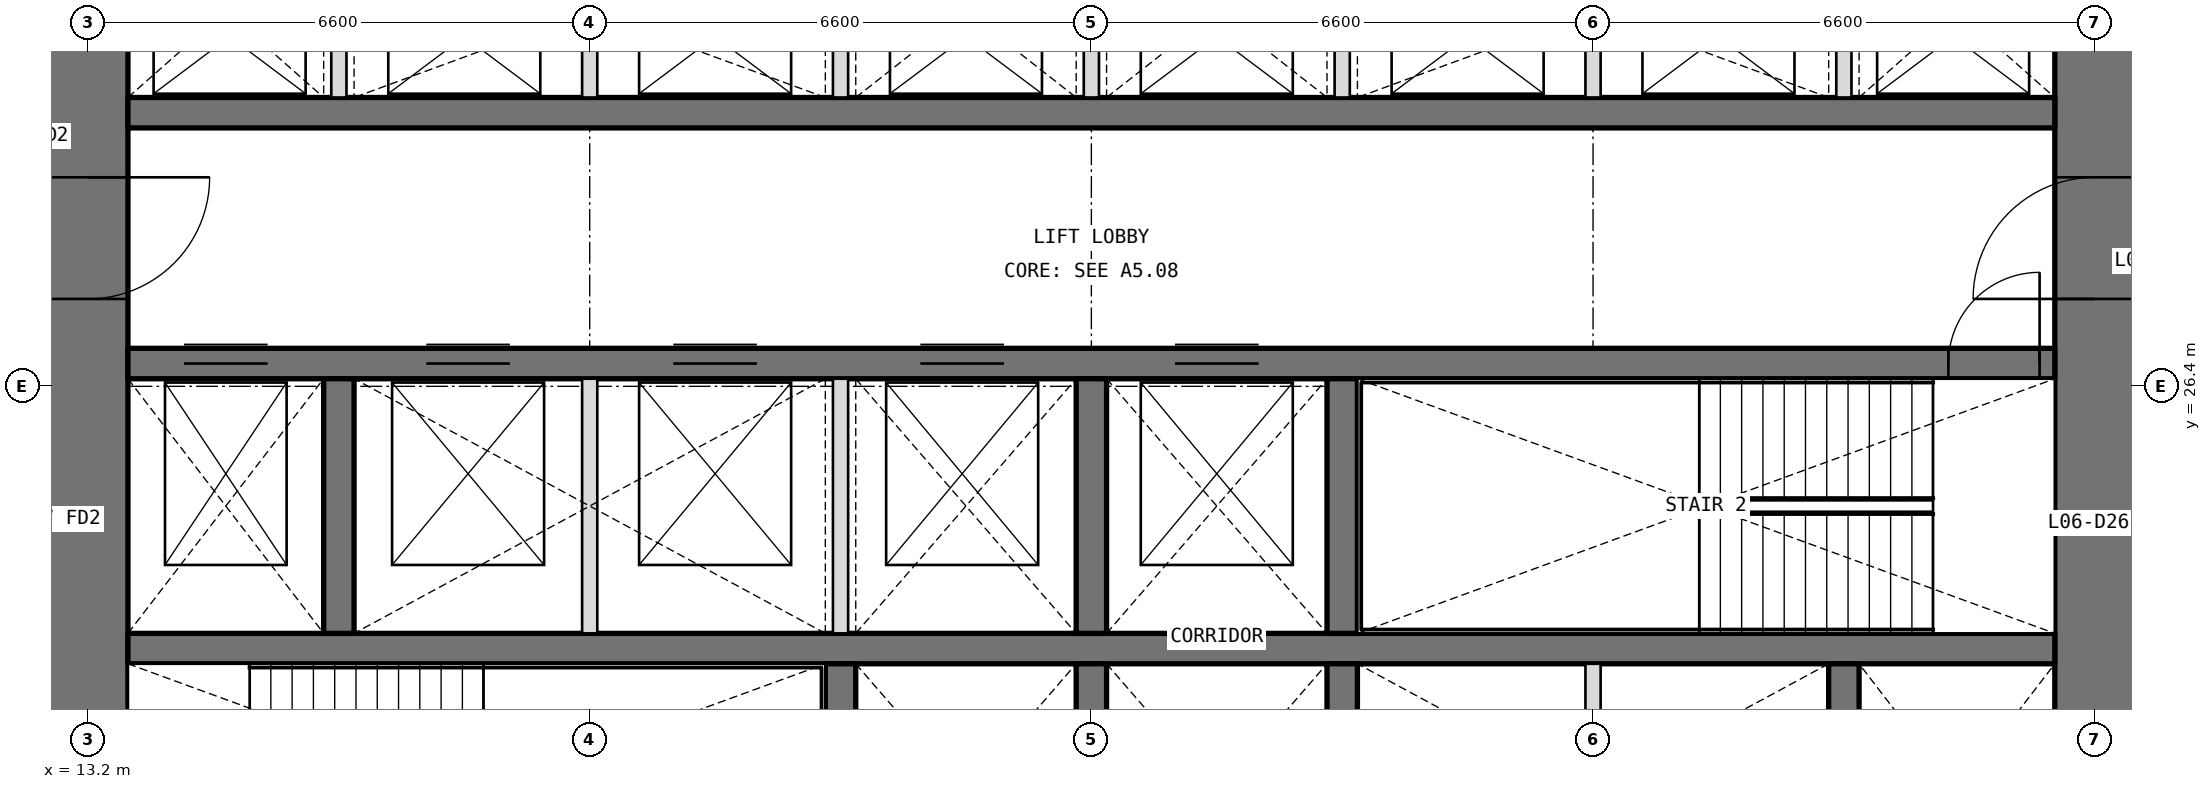
"""IFC4 building model, lengths in metres.
Left out: names, types, materials, properties, quantities, classifications, styles, units other than length and angle.
Written with IfcOpenShell. Run it as: python <this file> out.ifc"""

import sys

from ifc_helpers import new_model, si_unit, direction, frame, frame_2d, origin, place, context, subcontext, project, spatial, rectangle, extrude, element, fill, save


model = new_model("IFC4")
c1 = context("Model", 3, precision=1e-05, world=origin(), true_north=direction((0.0, 1.0)))
c2 = subcontext(c1, "Body", "Model", "MODEL_VIEW")
j1 = project(units=[si_unit("LENGTHUNIT", "METRE"), si_unit("PLANEANGLEUNIT", "RADIAN")], contexts=[c1])
p1 = place(None, origin())
s1 = spatial("IfcSite", under=j1, at=p1, CompositionType="ELEMENT")
p2 = place(p1, origin())
s2 = spatial("IfcBuilding", under=s1, at=p2, CompositionType="ELEMENT")
p3 = place(p2, frame((0.0, 0.0, 29.7)))
s3 = spatial("IfcBuildingStorey", under=s2, at=p3, CompositionType="ELEMENT", Elevation=29.7)
p4 = place(p3, frame((39.6, 13.725, 0.0), z_axis=(0.0, 0.0, 1.0), x_axis=(0.0, 1.0, 0.0)))
e1 = element("IfcWall", 1, at=p4, inside=s3, PredefinedType="SHEAR", context=c2, shape_type="SweptSolid", body=[
    extrude(rectangle(XDim=18.75, YDim=1.05, at=frame_2d((9.375, 0.0))), origin(), (0.0, 0.0, 1.0), 4.2),
])
p5 = place(p4, frame((3.025, 0.0, 0.0)))
e2 = element("IfcOpeningElement", 2, at=p5, cuts=e1, PredefinedType="OPENING", context=c2, shape_type="SweptSolid", body=[
    extrude(rectangle(XDim=1.6, YDim=2.1, at=frame_2d((0.8, 1.05))), frame((0.0, 0.535, 0.0), z_axis=(0.0, -1.0, 0.0), x_axis=(1.0, 0.0, 0.0)), (0.0, 0.0, 1.0), 1.07),
])
p6 = place(p4, frame((13.825, 0.0, 0.0)))
e3 = element("IfcOpeningElement", 3, at=p6, cuts=e1, PredefinedType="OPENING", context=c2, shape_type="SweptSolid", body=[
    extrude(rectangle(XDim=1.6, YDim=2.1, at=frame_2d((0.8, 1.05))), frame((0.0, 0.535, 0.0), z_axis=(0.0, -1.0, 0.0), x_axis=(1.0, 0.0, 0.0)), (0.0, 0.0, 1.0), 1.07),
])
p7 = place(p3, frame((13.2, 32.475, 0.0), z_axis=(0.0, 0.0, 1.0), x_axis=(0.0, -1.0, 0.0)))
e4 = element("IfcWall", 4, at=p7, inside=s3, PredefinedType="SHEAR", context=c2, shape_type="SweptSolid", body=[
    extrude(rectangle(XDim=18.75, YDim=1.05, at=frame_2d((9.375, 0.0))), origin(), (0.0, 0.0, 1.0), 4.2),
])
p8 = place(p7, frame((14.125, 0.0, 0.0)))
e5 = element("IfcOpeningElement", 5, at=p8, cuts=e4, PredefinedType="OPENING", context=c2, shape_type="SweptSolid", body=[
    extrude(rectangle(XDim=1.6, YDim=2.1, at=frame_2d((0.8, 1.05))), frame((0.0, 0.535, 0.0), z_axis=(0.0, -1.0, 0.0), x_axis=(1.0, 0.0, 0.0)), (0.0, 0.0, 1.0), 1.07),
])
p9 = place(p7, frame((3.325, 0.0, 0.0)))
e6 = element("IfcOpeningElement", 6, at=p9, cuts=e4, PredefinedType="OPENING", context=c2, shape_type="SweptSolid", body=[
    extrude(rectangle(XDim=1.6, YDim=2.1, at=frame_2d((0.8, 1.05))), frame((0.0, 0.535, 0.0), z_axis=(0.0, -1.0, 0.0), x_axis=(1.0, 0.0, 0.0)), (0.0, 0.0, 1.0), 1.07),
])
p10 = place(p3, frame((13.725, 22.95, 0.0), z_axis=(0.0, 0.0, 1.0), x_axis=(1.0, 0.0, 0.0)))
e7 = element("IfcWall", 7, at=p10, inside=s3, PredefinedType="SHEAR", context=c2, shape_type="SweptSolid", body=[
    extrude(rectangle(XDim=25.35, YDim=0.4, at=frame_2d((12.675, 0.0))), origin(), (0.0, 0.0, 1.0), 4.2),
])
p11 = place(p3, frame((13.725, 26.7, 0.0), z_axis=(0.0, 0.0, 1.0), x_axis=(1.0, 0.0, 0.0)))
e8 = element("IfcWall", 8, at=p11, inside=s3, PredefinedType="SHEAR", context=c2, shape_type="SweptSolid", body=[
    extrude(rectangle(XDim=25.35, YDim=0.4, at=frame_2d((12.675, 0.0))), origin(), (0.0, 0.0, 1.0), 4.2),
])
p12 = place(p11, frame((23.95, 0.0, 0.0)))
e9 = element("IfcOpeningElement", 9, at=p12, cuts=e8, PredefinedType="OPENING", context=c2, shape_type="SweptSolid", body=[
    extrude(rectangle(XDim=1.2, YDim=2.1, at=frame_2d((0.6, 1.05))), frame((0.0, 0.21, 0.0), z_axis=(0.0, -1.0, 0.0), x_axis=(1.0, 0.0, 0.0)), (0.0, 0.0, 1.0), 0.42),
])
p13 = place(p11, frame((0.738, 0.0, 0.0)))
e10 = element("IfcOpeningElement", 10, at=p13, cuts=e8, PredefinedType="OPENING", context=c2, shape_type="SweptSolid", body=[
    extrude(rectangle(XDim=1.1, YDim=2.1, at=frame_2d((0.55, 1.05))), frame((0.0, 0.21, 0.0), z_axis=(0.0, -1.0, 0.0), x_axis=(1.0, 0.0, 0.0)), (0.0, 0.0, 1.0), 0.42),
])
p14 = place(p11, frame((3.925, 0.0, 0.0)))
e11 = element("IfcOpeningElement", 11, at=p14, cuts=e8, PredefinedType="OPENING", context=c2, shape_type="SweptSolid", body=[
    extrude(rectangle(XDim=1.1, YDim=2.1, at=frame_2d((0.55, 1.05))), frame((0.0, 0.21, 0.0), z_axis=(0.0, -1.0, 0.0), x_axis=(1.0, 0.0, 0.0)), (0.0, 0.0, 1.0), 0.42),
])
p15 = place(p11, frame((7.175, 0.0, 0.0)))
e12 = element("IfcOpeningElement", 12, at=p15, cuts=e8, PredefinedType="OPENING", context=c2, shape_type="SweptSolid", body=[
    extrude(rectangle(XDim=1.1, YDim=2.1, at=frame_2d((0.55, 1.05))), frame((0.0, 0.21, 0.0), z_axis=(0.0, -1.0, 0.0), x_axis=(1.0, 0.0, 0.0)), (0.0, 0.0, 1.0), 0.42),
])
p16 = place(p11, frame((10.425, 0.0, 0.0)))
e13 = element("IfcOpeningElement", 13, at=p16, cuts=e8, PredefinedType="OPENING", context=c2, shape_type="SweptSolid", body=[
    extrude(rectangle(XDim=1.1, YDim=2.1, at=frame_2d((0.55, 1.05))), frame((0.0, 0.21, 0.0), z_axis=(0.0, -1.0, 0.0), x_axis=(1.0, 0.0, 0.0)), (0.0, 0.0, 1.0), 0.42),
])
p17 = place(p11, frame((13.775, 0.0, 0.0)))
e14 = element("IfcOpeningElement", 14, at=p17, cuts=e8, PredefinedType="OPENING", context=c2, shape_type="SweptSolid", body=[
    extrude(rectangle(XDim=1.1, YDim=2.1, at=frame_2d((0.55, 1.05))), frame((0.0, 0.21, 0.0), z_axis=(0.0, -1.0, 0.0), x_axis=(1.0, 0.0, 0.0)), (0.0, 0.0, 1.0), 0.42),
])
p18 = place(p3, frame((13.725, 30.0, 0.0), z_axis=(0.0, 0.0, 1.0), x_axis=(1.0, 0.0, 0.0)))
e15 = element("IfcWall", 15, at=p18, inside=s3, PredefinedType="SHEAR", context=c2, shape_type="SweptSolid", body=[
    extrude(rectangle(XDim=25.35, YDim=0.4, at=frame_2d((12.675, 0.0))), origin(), (0.0, 0.0, 1.0), 4.2),
])
for number, where, z_axis, x_axis in (
    (16, (23.1, 19.4, 0.0), (0.0, 0.0, 1.0), (0.0, 1.0, 0.0)),
    (17, (26.4, 19.4, 0.0), (0.0, 0.0, 1.0), (0.0, 1.0, 0.0)),
    (18, (29.7, 19.4, 0.0), (0.0, 0.0, 1.0), (0.0, 1.0, 0.0)),
    (19, (36.3, 19.4, 0.0), (0.0, 0.0, 1.0), (0.0, 1.0, 0.0)),
    (20, (16.5, 23.15, 0.0), (0.0, 0.0, 1.0), (0.0, 1.0, 0.0)),
    (21, (26.4, 23.15, 0.0), (0.0, 0.0, 1.0), (0.0, 1.0, 0.0)),
    (22, (29.7, 23.15, 0.0), (0.0, 0.0, 1.0), (0.0, 1.0, 0.0)),
):
    element("IfcWall", number, at=place(p3, frame(where, z_axis=z_axis, x_axis=x_axis)), inside=s3, PredefinedType="SHEAR", context=c2, shape_type="SweptSolid", body=[
        extrude(rectangle(XDim=3.35, YDim=0.4, at=frame_2d((1.675, 0.0))), origin(), (0.0, 0.0, 1.0), 4.2),
    ])
for number, where, z_axis, x_axis in (
    (23, (16.5, 30.2, 0.0), (0.0, 0.0, 1.0), (0.0, 1.0, 0.0)),
    (24, (19.8, 30.2, 0.0), (0.0, 0.0, 1.0), (0.0, 1.0, 0.0)),
    (25, (23.1, 30.2, 0.0), (0.0, 0.0, 1.0), (0.0, 1.0, 0.0)),
    (26, (26.4, 30.2, 0.0), (0.0, 0.0, 1.0), (0.0, 1.0, 0.0)),
    (27, (29.7, 30.2, 0.0), (0.0, 0.0, 1.0), (0.0, 1.0, 0.0)),
    (28, (33.0, 30.2, 0.0), (0.0, 0.0, 1.0), (0.0, 1.0, 0.0)),
    (29, (36.3, 30.2, 0.0), (0.0, 0.0, 1.0), (0.0, 1.0, 0.0)),
):
    element("IfcWall", number, at=place(p3, frame(where, z_axis=z_axis, x_axis=x_axis)), inside=s3, PredefinedType="PARTITIONING", context=c2, shape_type="SweptSolid", body=[
        extrude(rectangle(XDim=2.275, YDim=0.2, at=frame_2d((1.138, 0.0))), origin(), (0.0, 0.0, 1.0), 4.2),
    ])
for number, where, z_axis, x_axis in (
    (30, (33.0, 19.4, 0.0), (0.0, 0.0, 1.0), (0.0, 1.0, 0.0)),
    (31, (19.8, 23.15, 0.0), (0.0, 0.0, 1.0), (0.0, 1.0, 0.0)),
    (32, (23.1, 23.15, 0.0), (0.0, 0.0, 1.0), (0.0, 1.0, 0.0)),
):
    element("IfcWall", number, at=place(p3, frame(where, z_axis=z_axis, x_axis=x_axis)), inside=s3, PredefinedType="PARTITIONING", context=c2, shape_type="SweptSolid", body=[
        extrude(rectangle(XDim=3.35, YDim=0.2, at=frame_2d((1.675, 0.0))), origin(), (0.0, 0.0, 1.0), 4.2),
    ])
p19 = place(p12, origin())
e33 = element("IfcDoor", 33, at=p19, inside=s3, OperationType="SINGLE_SWING_RIGHT", PredefinedType="DOOR", context=c2, shape_type="SweptSolid", body=[
    extrude(rectangle(XDim=1.2, YDim=2.1, at=frame_2d((0.6, 1.05))), frame((0.0, 0.025, 0.0), z_axis=(0.0, -1.0, 0.0), x_axis=(1.0, 0.0, 0.0)), (0.0, 0.0, 1.0), 0.05),
])
fill(e9, e33)
p20 = place(p9, origin())
e34 = element("IfcDoor", 34, at=p20, inside=s3, OperationType="DOUBLE_DOOR_DOUBLE_SWING", PredefinedType="DOOR", context=c2, shape_type="SweptSolid", body=[
    extrude(rectangle(XDim=1.6, YDim=2.1, at=frame_2d((0.8, 1.05))), frame((0.0, 0.025, 0.0), z_axis=(0.0, -1.0, 0.0), x_axis=(1.0, 0.0, 0.0)), (0.0, 0.0, 1.0), 0.05),
])
fill(e6, e34)
p21 = place(p6, origin())
e35 = element("IfcDoor", 35, at=p21, inside=s3, OperationType="DOUBLE_DOOR_DOUBLE_SWING", PredefinedType="DOOR", context=c2, shape_type="SweptSolid", body=[
    extrude(rectangle(XDim=1.6, YDim=2.1, at=frame_2d((0.8, 1.05))), frame((0.0, 0.025, 0.0), z_axis=(0.0, -1.0, 0.0), x_axis=(1.0, 0.0, 0.0)), (0.0, 0.0, 1.0), 0.05),
])
fill(e3, e35)
p22 = place(p13, origin())
e36 = element("IfcDoor", 36, at=p22, inside=s3, OperationType="DOUBLE_DOOR_SLIDING", PredefinedType="DOOR", context=c2, shape_type="SweptSolid", body=[
    extrude(rectangle(XDim=1.1, YDim=2.1, at=frame_2d((0.55, 1.05))), frame((0.0, 0.025, 0.0), z_axis=(0.0, -1.0, 0.0), x_axis=(1.0, 0.0, 0.0)), (0.0, 0.0, 1.0), 0.05),
])
fill(e10, e36)
p23 = place(p14, origin())
e37 = element("IfcDoor", 37, at=p23, inside=s3, OperationType="DOUBLE_DOOR_SLIDING", PredefinedType="DOOR", context=c2, shape_type="SweptSolid", body=[
    extrude(rectangle(XDim=1.1, YDim=2.1, at=frame_2d((0.55, 1.05))), frame((0.0, 0.025, 0.0), z_axis=(0.0, -1.0, 0.0), x_axis=(1.0, 0.0, 0.0)), (0.0, 0.0, 1.0), 0.05),
])
fill(e11, e37)
p24 = place(p15, origin())
e38 = element("IfcDoor", 38, at=p24, inside=s3, OperationType="DOUBLE_DOOR_SLIDING", PredefinedType="DOOR", context=c2, shape_type="SweptSolid", body=[
    extrude(rectangle(XDim=1.1, YDim=2.1, at=frame_2d((0.55, 1.05))), frame((0.0, 0.025, 0.0), z_axis=(0.0, -1.0, 0.0), x_axis=(1.0, 0.0, 0.0)), (0.0, 0.0, 1.0), 0.05),
])
fill(e12, e38)
p25 = place(p16, origin())
e39 = element("IfcDoor", 39, at=p25, inside=s3, OperationType="DOUBLE_DOOR_SLIDING", PredefinedType="DOOR", context=c2, shape_type="SweptSolid", body=[
    extrude(rectangle(XDim=1.1, YDim=2.1, at=frame_2d((0.55, 1.05))), frame((0.0, 0.025, 0.0), z_axis=(0.0, -1.0, 0.0), x_axis=(1.0, 0.0, 0.0)), (0.0, 0.0, 1.0), 0.05),
])
fill(e13, e39)
p26 = place(p17, origin())
e40 = element("IfcDoor", 40, at=p26, inside=s3, OperationType="DOUBLE_DOOR_SLIDING", PredefinedType="DOOR", context=c2, shape_type="SweptSolid", body=[
    extrude(rectangle(XDim=1.1, YDim=2.1, at=frame_2d((0.55, 1.05))), frame((0.0, 0.025, 0.0), z_axis=(0.0, -1.0, 0.0), x_axis=(1.0, 0.0, 0.0)), (0.0, 0.0, 1.0), 0.05),
])
fill(e14, e40)
save(model, sys.argv[1])
